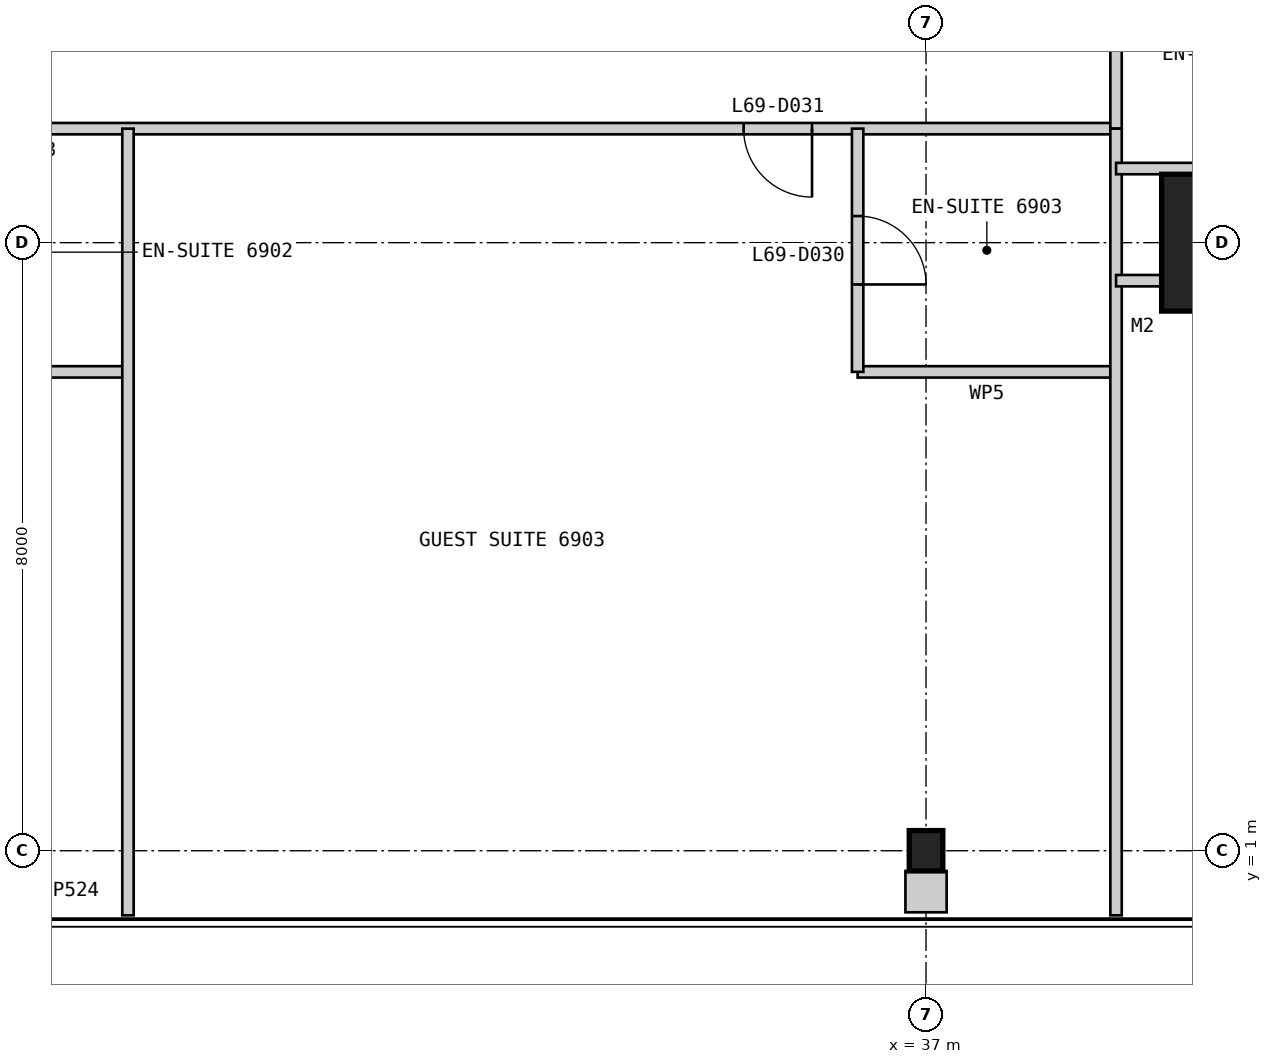
"""IFC4 building model, lengths in metres.
Left out: names, types, materials, properties, quantities, classifications, styles, units other than length and angle.
Written with IfcOpenShell. Run it as: python <this file> out.ifc"""

import sys

from ifc_helpers import new_model, si_unit, direction, frame, frame_2d, origin, origin_2d, place, context, subcontext, project, spatial, rectangle, i_section, extrude, element, fill, save


model = new_model("IFC4")
c1 = context("Model", 3, precision=1e-05, world=origin(), true_north=direction((0.0, 1.0)))
c2 = subcontext(c1, "Body", "Model", "MODEL_VIEW")
j1 = project(units=[si_unit("LENGTHUNIT", "METRE"), si_unit("PLANEANGLEUNIT", "RADIAN")], contexts=[c1])
p1 = place(None, origin())
s1 = spatial("IfcSite", under=j1, at=p1, CompositionType="ELEMENT")
p2 = place(p1, origin())
s2 = spatial("IfcBuilding", under=s1, at=p2, CompositionType="ELEMENT")
p3 = place(p2, frame((0.0, 0.0, 286.6)))
s3 = spatial("IfcBuildingStorey", under=s2, at=p3, CompositionType="ELEMENT", Elevation=286.6)
p4 = place(p3, frame((41.0, 9.0, 0.0), z_axis=(0.0, 0.0, 1.0), x_axis=(1.0, 0.0, 0.0)))
e1 = element("IfcColumn", 1, at=p4, inside=s3, PredefinedType="COLUMN", context=c2, shape_type="SweptSolid", body=[
    extrude(rectangle(XDim=1.8, YDim=1.8, at=origin_2d()), origin(), (0.0, 0.0, 1.0), 3.4),
])
p5 = place(p3, frame((37.0, 1.0, 0.0), z_axis=(0.0, 0.0, 1.0), x_axis=(1.0, 0.0, 0.0)))
e2 = element("IfcColumn", 2, at=p5, inside=s3, PredefinedType="COLUMN", context=c2, shape_type="SweptSolid", body=[
    extrude(i_section(OverallWidth=0.442, OverallDepth=0.531, WebThickness=0.066, FlangeThickness=0.106, at=origin_2d()), origin(), (0.0, 0.0, 1.0), 3.4),
])
p6 = place(p3, frame((10.5, 10.5, 0.0), z_axis=(0.0, 0.0, 1.0), x_axis=(1.0, 0.0, 0.0)))
e3 = element("IfcWall", 3, at=p6, inside=s3, PredefinedType="PARTITIONING", context=c2, shape_type="SweptSolid", body=[
    extrude(rectangle(XDim=29.0, YDim=0.15, at=frame_2d((14.5, 0.0))), origin(), (0.0, 0.0, 1.0), 3.25),
])
p7 = place(p6, frame((1.85, 0.0, 0.0)))
e4 = element("IfcOpeningElement", 4, at=p7, cuts=e3, PredefinedType="OPENING", context=c2, shape_type="SweptSolid", body=[
    extrude(rectangle(XDim=0.9, YDim=2.1, at=frame_2d((0.45, 1.05))), frame((0.0, 0.085, 0.0), z_axis=(0.0, -1.0, 0.0), x_axis=(1.0, 0.0, 0.0)), (0.0, 0.0, 1.0), 0.17),
])
p8 = place(p6, frame((11.5, 0.0, 0.0)))
e5 = element("IfcOpeningElement", 5, at=p8, cuts=e3, PredefinedType="OPENING", context=c2, shape_type="SweptSolid", body=[
    extrude(rectangle(XDim=0.9, YDim=2.1, at=frame_2d((0.45, 1.05))), frame((0.0, 0.085, 0.0), z_axis=(0.0, -1.0, 0.0), x_axis=(1.0, 0.0, 0.0)), (0.0, 0.0, 1.0), 0.17),
])
p9 = place(p6, frame((24.1, 0.0, 0.0)))
e6 = element("IfcOpeningElement", 6, at=p9, cuts=e3, PredefinedType="OPENING", context=c2, shape_type="SweptSolid", body=[
    extrude(rectangle(XDim=0.9, YDim=2.1, at=frame_2d((0.45, 1.05))), frame((0.0, 0.085, 0.0), z_axis=(0.0, -1.0, 0.0), x_axis=(1.0, 0.0, 0.0)), (0.0, 0.0, 1.0), 0.17),
])
p10 = place(p3, frame((23.5, 7.3, 0.0), z_axis=(0.0, 0.0, 1.0), x_axis=(1.0, 0.0, 0.0)))
e7 = element("IfcWall", 7, at=p10, inside=s3, PredefinedType="PARTITIONING", context=c2, shape_type="SweptSolid", body=[
    extrude(rectangle(XDim=3.0, YDim=0.15, at=frame_2d((1.5, 0.0))), origin(), (0.0, 0.0, 1.0), 3.25),
])
p11 = place(p3, frame((26.5, 0.15, 0.0), z_axis=(0.0, 0.0, 1.0), x_axis=(0.0, 1.0, 0.0)))
e8 = element("IfcWall", 8, at=p11, inside=s3, PredefinedType="PARTITIONING", context=c2, shape_type="SweptSolid", body=[
    extrude(rectangle(XDim=10.35, YDim=0.15, at=frame_2d((5.175, 0.0))), origin(), (0.0, 0.0, 1.0), 3.25),
])
p12 = place(p3, frame((36.1, 7.3, 0.0), z_axis=(0.0, 0.0, 1.0), x_axis=(1.0, 0.0, 0.0)))
e9 = element("IfcWall", 9, at=p12, inside=s3, PredefinedType="PARTITIONING", context=c2, shape_type="SweptSolid", body=[
    extrude(rectangle(XDim=3.4, YDim=0.15, at=frame_2d((1.7, 0.0))), origin(), (0.0, 0.0, 1.0), 3.25),
])
p13 = place(p3, frame((36.1, 7.3, 0.0), z_axis=(0.0, 0.0, 1.0), x_axis=(0.0, 1.0, 0.0)))
e10 = element("IfcWall", 10, at=p13, inside=s3, PredefinedType="PARTITIONING", context=c2, shape_type="SweptSolid", body=[
    extrude(rectangle(XDim=3.2, YDim=0.15, at=frame_2d((1.6, 0.0))), origin(), (0.0, 0.0, 1.0), 3.25),
])
p14 = place(p13, frame((1.15, 0.0, 0.0)))
e11 = element("IfcOpeningElement", 11, at=p14, cuts=e10, PredefinedType="OPENING", context=c2, shape_type="SweptSolid", body=[
    extrude(rectangle(XDim=0.9, YDim=2.1, at=frame_2d((0.45, 1.05))), frame((0.0, 0.085, 0.0), z_axis=(0.0, -1.0, 0.0), x_axis=(1.0, 0.0, 0.0)), (0.0, 0.0, 1.0), 0.17),
])
p15 = place(p3, frame((39.5, 10.5, 0.0), z_axis=(0.0, 0.0, 1.0), x_axis=(0.0, 1.0, 0.0)))
e12 = element("IfcWall", 12, at=p15, inside=s3, PredefinedType="PARTITIONING", context=c2, shape_type="SweptSolid", body=[
    extrude(rectangle(XDim=29.0, YDim=0.15, at=frame_2d((14.5, 0.0))), origin(), (0.0, 0.0, 1.0), 3.25),
])
p16 = place(p15, frame((2.775, 0.0, 0.0)))
e13 = element("IfcOpeningElement", 13, at=p16, cuts=e12, PredefinedType="OPENING", context=c2, shape_type="SweptSolid", body=[
    extrude(rectangle(XDim=0.9, YDim=2.1, at=frame_2d((0.45, 1.05))), frame((0.0, 0.085, 0.0), z_axis=(0.0, -1.0, 0.0), x_axis=(1.0, 0.0, 0.0)), (0.0, 0.0, 1.0), 0.17),
])
p17 = place(p15, frame((11.1, 0.0, 0.0)))
e14 = element("IfcOpeningElement", 14, at=p17, cuts=e12, PredefinedType="OPENING", context=c2, shape_type="SweptSolid", body=[
    extrude(rectangle(XDim=0.9, YDim=2.1, at=frame_2d((0.45, 1.05))), frame((0.0, 0.085, 0.0), z_axis=(0.0, -1.0, 0.0), x_axis=(1.0, 0.0, 0.0)), (0.0, 0.0, 1.0), 0.17),
])
p18 = place(p15, frame((17.2, 0.0, 0.0)))
e15 = element("IfcOpeningElement", 15, at=p18, cuts=e12, PredefinedType="OPENING", context=c2, shape_type="SweptSolid", body=[
    extrude(rectangle(XDim=1.0, YDim=2.1, at=frame_2d((0.5, 1.05))), frame((0.0, 0.085, 0.0), z_axis=(0.0, -1.0, 0.0), x_axis=(1.0, 0.0, 0.0)), (0.0, 0.0, 1.0), 0.17),
])
p19 = place(p15, frame((24.5, 0.0, 0.0)))
e16 = element("IfcOpeningElement", 16, at=p19, cuts=e12, PredefinedType="OPENING", context=c2, shape_type="SweptSolid", body=[
    extrude(rectangle(XDim=0.9, YDim=2.1, at=frame_2d((0.45, 1.05))), frame((0.0, 0.085, 0.0), z_axis=(0.0, -1.0, 0.0), x_axis=(1.0, 0.0, 0.0)), (0.0, 0.0, 1.0), 0.17),
])
p20 = place(p3, frame((39.5, 0.15, 0.0), z_axis=(0.0, 0.0, 1.0), x_axis=(0.0, 1.0, 0.0)))
e17 = element("IfcWall", 17, at=p20, inside=s3, PredefinedType="PARTITIONING", context=c2, shape_type="SweptSolid", body=[
    extrude(rectangle(XDim=10.35, YDim=0.15, at=frame_2d((5.175, 0.0))), origin(), (0.0, 0.0, 1.0), 3.25),
])
p21 = place(p3, frame((42.7, 9.975, 0.0), z_axis=(0.0, 0.0, 1.0), x_axis=(-1.0, 0.0, 0.0)))
e18 = element("IfcWall", 18, at=p21, inside=s3, PredefinedType="PARTITIONING", context=c2, shape_type="SweptSolid", body=[
    extrude(rectangle(XDim=3.2, YDim=0.15, at=frame_2d((1.6, 0.0))), origin(), (0.0, 0.0, 1.0), 3.25),
])
p22 = place(p3, frame((49.85, 8.5, 0.0), z_axis=(0.0, 0.0, 1.0), x_axis=(-1.0, 0.0, 0.0)))
e19 = element("IfcWall", 19, at=p22, inside=s3, PredefinedType="PARTITIONING", context=c2, shape_type="SweptSolid", body=[
    extrude(rectangle(XDim=10.35, YDim=0.15, at=frame_2d((5.175, 0.0))), origin(), (0.0, 0.0, 1.0), 3.25),
])
p23 = place(p22, frame((5.0, 0.0, 0.0)))
e20 = element("IfcOpeningElement", 20, at=p23, cuts=e19, PredefinedType="OPENING", context=c2, shape_type="SweptSolid", body=[
    extrude(rectangle(XDim=0.9, YDim=2.1, at=frame_2d((0.45, 1.05))), frame((0.0, 0.085, 0.0), z_axis=(0.0, -1.0, 0.0), x_axis=(1.0, 0.0, 0.0)), (0.0, 0.0, 1.0), 0.17),
])
p24 = place(p3, frame((37.0, 0.19, 0.0), z_axis=(0.0, 0.0, 1.0), x_axis=(0.0, 1.0, 0.0)))
e21 = element("IfcWall", 21, at=p24, inside=s3, PredefinedType="PARTITIONING", context=c2, shape_type="SweptSolid", body=[
    extrude(rectangle(XDim=0.545, YDim=0.542, at=frame_2d((0.272, 0.0))), origin(), (0.0, 0.0, 1.0), 3.25),
])
p25 = place(p14, frame((0.9, 0.0, 0.0), z_axis=(0.0, 0.0, 1.0), x_axis=(-1.0, 0.0, 0.0)))
e22 = element("IfcDoor", 22, at=p25, inside=s3, OperationType="SINGLE_SWING_RIGHT", PredefinedType="DOOR", context=c2, shape_type="SweptSolid", body=[
    extrude(rectangle(XDim=0.9, YDim=2.1, at=frame_2d((0.45, 1.05))), frame((0.0, 0.025, 0.0), z_axis=(0.0, -1.0, 0.0), x_axis=(1.0, 0.0, 0.0)), (0.0, 0.0, 1.0), 0.05),
])
fill(e11, e22)
p26 = place(p9, frame((0.9, 0.0, 0.0), z_axis=(0.0, 0.0, 1.0), x_axis=(-1.0, 0.0, 0.0)))
e23 = element("IfcDoor", 23, at=p26, inside=s3, OperationType="SINGLE_SWING_LEFT", PredefinedType="DOOR", context=c2, shape_type="SweptSolid", body=[
    extrude(rectangle(XDim=0.9, YDim=2.1, at=frame_2d((0.45, 1.05))), frame((0.0, 0.025, 0.0), z_axis=(0.0, -1.0, 0.0), x_axis=(1.0, 0.0, 0.0)), (0.0, 0.0, 1.0), 0.05),
])
fill(e6, e23)
save(model, sys.argv[1])
